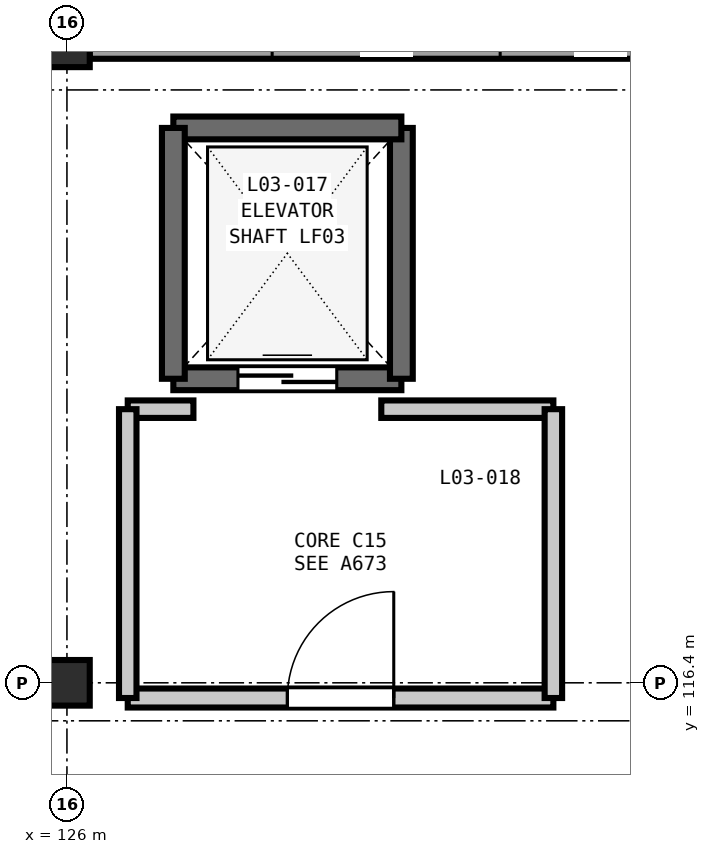
"""IFC4 building model, lengths in metres.
Left out: names, types, materials, properties, quantities, classifications, styles, units other than length and angle.
Written with IfcOpenShell. Run it as: python <this file> out.ifc"""

import sys

from ifc_helpers import new_model, si_unit, direction, frame, frame_2d, origin, origin_2d, place, context, subcontext, project, spatial, rectangle, extrude, element, fill, save


model = new_model("IFC4")
c1 = context("Model", 3, precision=1e-05, world=origin(), true_north=direction((0.0, 1.0)))
c2 = subcontext(c1, "Body", "Model", "MODEL_VIEW")
j1 = project(units=[si_unit("LENGTHUNIT", "METRE"), si_unit("PLANEANGLEUNIT", "RADIAN")], contexts=[c1])
p1 = place(None, origin())
s1 = spatial("IfcSite", under=j1, at=p1, CompositionType="ELEMENT")
p2 = place(p1, origin())
s2 = spatial("IfcBuilding", under=s1, at=p2, CompositionType="ELEMENT")
p3 = place(p2, frame((0.0, 0.0, 16.2)))
s3 = spatial("IfcBuildingStorey", under=s2, at=p3, CompositionType="ELEMENT", Elevation=16.2)
for number, where, z_axis, x_axis in (
    (1, (126.0, 116.4, 0.0), (0.0, 0.0, 1.0), (1.0, 0.0, 0.0)),
    (2, (126.0, 124.8, 0.0), (0.0, 0.0, 1.0), (1.0, 0.0, 0.0)),
):
    element("IfcColumn", number, at=place(p3, frame(where, z_axis=z_axis, x_axis=x_axis)), inside=s3, PredefinedType="COLUMN", context=c2, shape_type="SweptSolid", body=[
        extrude(rectangle(XDim=0.6, YDim=0.6, at=origin_2d()), origin(), (0.0, 0.0, 1.0), 4.2),
    ])
p4 = place(p3, frame((126.298, 124.8, 0.0), z_axis=(0.0, 0.0, 1.0), x_axis=(1.0, 0.0, 0.0)))
e3 = element("IfcWall", 3, at=p4, inside=s3, PredefinedType="SOLIDWALL", context=c2, shape_type="SweptSolid", body=[
    extrude(rectangle(XDim=7.804, YDim=0.38, at=frame_2d((3.902, 0.0))), origin(), (0.0, 0.0, 1.0), 3.48),
])
p5 = place(p4, frame((2.402, 0.0, 0.9)))
e4 = element("IfcOpeningElement", 4, at=p5, cuts=e3, PredefinedType="OPENING", context=c2, shape_type="SweptSolid", body=[
    extrude(rectangle(XDim=3.0, YDim=2.15, at=frame_2d((1.5, 1.075))), frame((0.0, 0.2, 0.0), z_axis=(0.0, -1.0, 0.0), x_axis=(1.0, 0.0, 0.0)), (0.0, 0.0, 1.0), 0.4),
])
p6 = place(p3, frame((127.4, 120.4, 0.0), z_axis=(0.0, 0.0, 1.0), x_axis=(1.0, 0.0, 0.0)))
e5 = element("IfcWall", 5, at=p6, inside=s3, PredefinedType="SHEAR", context=c2, shape_type="SweptSolid", body=[
    extrude(rectangle(XDim=3.0, YDim=0.3, at=frame_2d((1.5, 0.0))), origin(), (0.0, 0.0, 1.0), 4.2),
])
p7 = place(p6, frame((0.85, 0.0, 0.0)))
e6 = element("IfcOpeningElement", 6, at=p7, cuts=e5, PredefinedType="OPENING", context=c2, shape_type="SweptSolid", body=[
    extrude(rectangle(XDim=1.3, YDim=2.2, at=frame_2d((0.65, 1.1))), frame((0.0, 0.16, 0.0), z_axis=(0.0, -1.0, 0.0), x_axis=(1.0, 0.0, 0.0)), (0.0, 0.0, 1.0), 0.32),
])
p8 = place(p3, frame((130.4, 120.4, 0.0), z_axis=(0.0, 0.0, 1.0), x_axis=(0.0, 1.0, 0.0)))
e7 = element("IfcWall", 7, at=p8, inside=s3, PredefinedType="SHEAR", context=c2, shape_type="SweptSolid", body=[
    extrude(rectangle(XDim=3.3, YDim=0.3, at=frame_2d((1.65, 0.0))), origin(), (0.0, 0.0, 1.0), 4.2),
])
p9 = place(p3, frame((130.4, 123.7, 0.0), z_axis=(0.0, 0.0, 1.0), x_axis=(-1.0, 0.0, 0.0)))
e8 = element("IfcWall", 8, at=p9, inside=s3, PredefinedType="SHEAR", context=c2, shape_type="SweptSolid", body=[
    extrude(rectangle(XDim=3.0, YDim=0.3, at=frame_2d((1.5, 0.0))), origin(), (0.0, 0.0, 1.0), 4.2),
])
p10 = place(p3, frame((127.4, 123.7, 0.0), z_axis=(0.0, 0.0, 1.0), x_axis=(0.0, -1.0, 0.0)))
e9 = element("IfcWall", 9, at=p10, inside=s3, PredefinedType="SHEAR", context=c2, shape_type="SweptSolid", body=[
    extrude(rectangle(XDim=3.3, YDim=0.3, at=frame_2d((1.65, 0.0))), origin(), (0.0, 0.0, 1.0), 4.2),
])
p11 = place(p3, frame((126.8, 116.2, 0.0), z_axis=(0.0, 0.0, 1.0), x_axis=(1.0, 0.0, 0.0)))
e10 = element("IfcWall", 10, at=p11, inside=s3, PredefinedType="PARTITIONING", context=c2, shape_type="SweptSolid", body=[
    extrude(rectangle(XDim=5.6, YDim=0.25, at=frame_2d((2.8, 0.0))), origin(), (0.0, 0.0, 1.0), 3.535),
])
p12 = place(p11, frame((2.1, 0.0, 0.0)))
e11 = element("IfcOpeningElement", 11, at=p12, cuts=e10, PredefinedType="OPENING", context=c2, shape_type="SweptSolid", body=[
    extrude(rectangle(XDim=1.4, YDim=2.2, at=frame_2d((0.7, 1.1))), frame((0.0, 0.135, 0.0), z_axis=(0.0, -1.0, 0.0), x_axis=(1.0, 0.0, 0.0)), (0.0, 0.0, 1.0), 0.27),
])
p13 = place(p3, frame((130.136, 120.0, 0.0), z_axis=(0.0, 0.0, 1.0), x_axis=(1.0, 0.0, 0.0)))
e12 = element("IfcWall", 12, at=p13, inside=s3, PredefinedType="PARTITIONING", context=c2, shape_type="SweptSolid", body=[
    extrude(rectangle(XDim=2.264, YDim=0.23, at=frame_2d((1.132, 0.0))), origin(), (0.0, 0.0, 1.0), 3.89),
])
p14 = place(p3, frame((126.8, 120.0, 0.0), z_axis=(0.0, 0.0, 1.0), x_axis=(1.0, 0.0, 0.0)))
e13 = element("IfcWall", 13, at=p14, inside=s3, PredefinedType="PARTITIONING", context=c2, shape_type="SweptSolid", body=[
    extrude(rectangle(XDim=0.864, YDim=0.23, at=frame_2d((0.432, 0.0))), origin(), (0.0, 0.0, 1.0), 3.89),
])
for number, where, z_axis, x_axis in (
    (14, (126.8, 116.2, 0.0), (0.0, 0.0, 1.0), (0.0, 1.0, 0.0)),
    (15, (132.4, 116.2, 0.0), (0.0, 0.0, 1.0), (0.0, 1.0, 0.0)),
):
    element("IfcWall", number, at=place(p3, frame(where, z_axis=z_axis, x_axis=x_axis)), inside=s3, PredefinedType="PARTITIONING", context=c2, shape_type="SweptSolid", body=[
        extrude(rectangle(XDim=3.8, YDim=0.23, at=frame_2d((1.9, 0.0))), origin(), (0.0, 0.0, 1.0), 3.89),
    ])
p15 = place(p7, origin())
e16 = element("IfcDoor", 16, at=p15, inside=s3, OperationType="DOUBLE_DOOR_SLIDING", PredefinedType="DOOR", context=c2, shape_type="SweptSolid", body=[
    extrude(rectangle(XDim=1.3, YDim=2.2, at=frame_2d((0.65, 1.1))), frame((0.0, 0.025, 0.0), z_axis=(0.0, -1.0, 0.0), x_axis=(1.0, 0.0, 0.0)), (0.0, 0.0, 1.0), 0.05),
])
fill(e6, e16)
p16 = place(p12, origin())
e17 = element("IfcDoor", 17, at=p16, inside=s3, OperationType="SINGLE_SWING_RIGHT", PredefinedType="DOOR", context=c2, shape_type="SweptSolid", body=[
    extrude(rectangle(XDim=1.4, YDim=2.2, at=frame_2d((0.7, 1.1))), frame((0.0, 0.025, 0.0), z_axis=(0.0, -1.0, 0.0), x_axis=(1.0, 0.0, 0.0)), (0.0, 0.0, 1.0), 0.05),
])
fill(e11, e17)
save(model, sys.argv[1])
